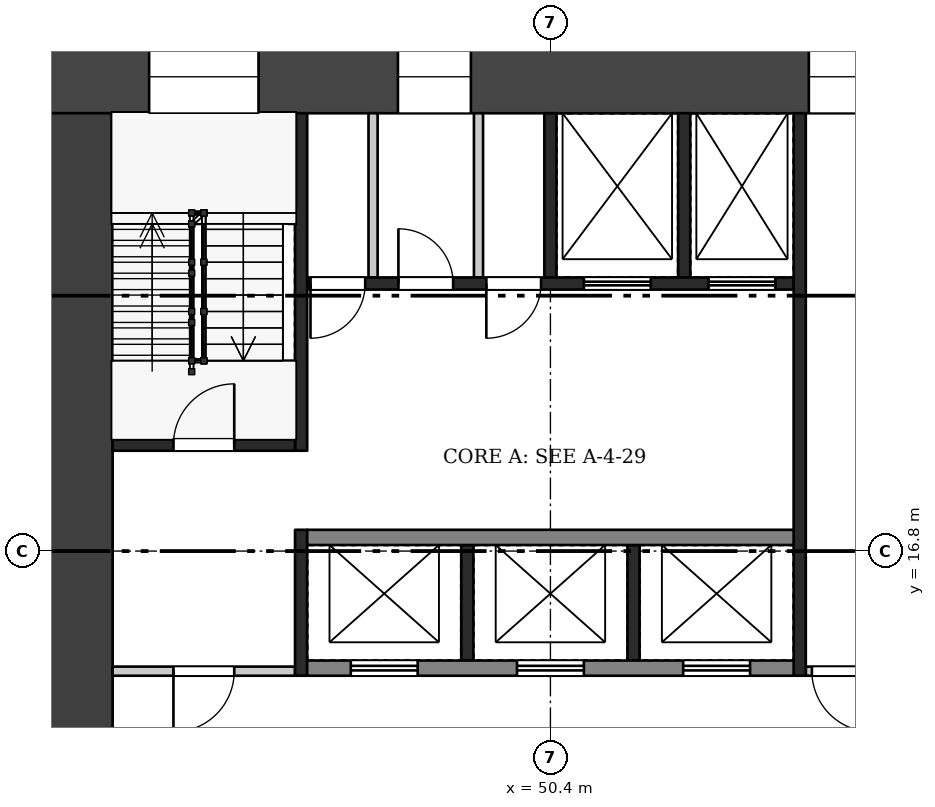
"""IFC4 building model, lengths in metres.
Left out: names, types, materials, properties, quantities, classifications, styles, units other than length and angle.
Written with IfcOpenShell. Run it as: python <this file> out.ifc"""

import sys

from ifc_helpers import new_model, si_unit, direction, frame, frame_2d, origin, place, context, subcontext, project, spatial, rectangle, extrude, element, fill, save


model = new_model("IFC4")
c1 = context("Model", 3, precision=1e-05, world=origin(), true_north=direction((0.0, 1.0)))
c2 = subcontext(c1, "Body", "Model", "MODEL_VIEW")
j1 = project(units=[si_unit("LENGTHUNIT", "METRE"), si_unit("PLANEANGLEUNIT", "RADIAN")], contexts=[c1])
p1 = place(None, origin())
s1 = spatial("IfcSite", under=j1, at=p1, CompositionType="ELEMENT")
p2 = place(p1, origin())
s2 = spatial("IfcBuilding", under=s1, at=p2, CompositionType="ELEMENT")
p3 = place(p2, frame((0.0, 0.0, 207.2)))
s3 = spatial("IfcBuildingStorey", under=s2, at=p3, CompositionType="ELEMENT", Elevation=207.2)
p4 = place(p3, frame((42.0, 24.6, 0.0), z_axis=(0.0, 0.0, 1.0), x_axis=(1.0, 0.0, 0.0)))
e1 = element("IfcWall", 1, at=p4, inside=s3, PredefinedType="SHEAR", context=c2, shape_type="SweptSolid", body=[
    extrude(rectangle(XDim=16.8, YDim=1.2, at=frame_2d((8.4, 0.0))), origin(), (0.0, 0.0, 1.0), 6.72),
])
p5 = place(p4, frame((1.8, 0.0, 0.5)))
e2 = element("IfcOpeningElement", 2, at=p5, cuts=e1, PredefinedType="OPENING", context=c2, shape_type="SweptSolid", body=[
    extrude(rectangle(XDim=1.8, YDim=2.4, at=frame_2d((0.9, 1.2))), frame((0.0, 0.61, 0.0), z_axis=(0.0, -1.0, 0.0), x_axis=(1.0, 0.0, 0.0)), (0.0, 0.0, 1.0), 1.22),
])
p6 = place(p4, frame((5.892, 0.0, 1.6)))
e3 = element("IfcOpeningElement", 3, at=p6, cuts=e1, PredefinedType="OPENING", context=c2, shape_type="SweptSolid", body=[
    extrude(rectangle(XDim=1.2, YDim=1.2, at=frame_2d((0.6, 0.6))), frame((0.0, 0.61, 0.0), z_axis=(0.0, -1.0, 0.0), x_axis=(1.0, 0.0, 0.0)), (0.0, 0.0, 1.0), 1.22),
])
p7 = place(p4, frame((12.65, 0.0, 0.6)))
e4 = element("IfcOpeningElement", 4, at=p7, cuts=e1, PredefinedType="OPENING", context=c2, shape_type="SweptSolid", body=[
    extrude(rectangle(XDim=1.0, YDim=2.1, at=frame_2d((0.5, 1.05))), frame((0.0, 0.61, 0.0), z_axis=(0.0, -1.0, 0.0), x_axis=(1.0, 0.0, 0.0)), (0.0, 0.0, 1.0), 1.22),
])
p8 = place(p4, frame((14.175, 0.0, 1.6)))
e5 = element("IfcOpeningElement", 5, at=p8, cuts=e1, PredefinedType="OPENING", context=c2, shape_type="SweptSolid", body=[
    extrude(rectangle(XDim=1.2, YDim=1.2, at=frame_2d((0.6, 0.6))), frame((0.0, 0.61, 0.0), z_axis=(0.0, -1.0, 0.0), x_axis=(1.0, 0.0, 0.0)), (0.0, 0.0, 1.0), 1.22),
])
p9 = place(p3, frame((42.6, 9.6, 0.0), z_axis=(0.0, 0.0, 1.0), x_axis=(0.0, 1.0, 0.0)))
e6 = element("IfcWall", 6, at=p9, inside=s3, PredefinedType="SHEAR", context=c2, shape_type="SweptSolid", body=[
    extrude(rectangle(XDim=14.4, YDim=1.2, at=frame_2d((7.2, 0.0))), origin(), (0.0, 0.0, 1.0), 6.72),
])
p10 = place(p9, frame((2.1, 0.0, 0.0)))
e7 = element("IfcOpeningElement", 7, at=p10, cuts=e6, PredefinedType="OPENING", context=c2, shape_type="SweptSolid", body=[
    extrude(rectangle(XDim=1.8, YDim=2.1, at=frame_2d((0.9, 1.05))), frame((0.0, 0.61, 0.0), z_axis=(0.0, -1.0, 0.0), x_axis=(1.0, 0.0, 0.0)), (0.0, 0.0, 1.0), 1.22),
])
for number, where, z_axis, x_axis in (
    (8, (49.033, 15.0, 0.0), (0.0, 0.0, 1.0), (0.0, 1.0, 0.0)),
    (9, (51.767, 15.0, 0.0), (0.0, 0.0, 1.0), (0.0, 1.0, 0.0)),
):
    element("IfcWall", number, at=place(p3, frame(where, z_axis=z_axis, x_axis=x_axis)), inside=s3, PredefinedType="SHEAR", context=c2, shape_type="SweptSolid", body=[
        extrude(rectangle(XDim=1.9, YDim=0.2, at=frame_2d((0.95, 0.0))), origin(), (0.0, 0.0, 1.0), 6.72),
    ])
p11 = place(p3, frame((46.4, 14.875, 0.0), z_axis=(0.0, 0.0, 1.0), x_axis=(1.0, 0.0, 0.0)))
e10 = element("IfcWall", 10, at=p11, inside=s3, PredefinedType="SHEAR", context=c2, shape_type="SweptSolid", body=[
    extrude(rectangle(XDim=8.0, YDim=0.25, at=frame_2d((4.0, 0.0))), origin(), (0.0, 0.0, 1.0), 6.72),
])
p12 = place(p11, frame((0.717, 0.0, 0.0)))
e11 = element("IfcOpeningElement", 11, at=p12, cuts=e10, PredefinedType="OPENING", context=c2, shape_type="SweptSolid", body=[
    extrude(rectangle(XDim=1.1, YDim=2.1, at=frame_2d((0.55, 1.05))), frame((0.0, 0.135, 0.0), z_axis=(0.0, -1.0, 0.0), x_axis=(1.0, 0.0, 0.0)), (0.0, 0.0, 1.0), 0.27),
])
p13 = place(p11, frame((3.45, 0.0, 0.0)))
e12 = element("IfcOpeningElement", 12, at=p13, cuts=e10, PredefinedType="OPENING", context=c2, shape_type="SweptSolid", body=[
    extrude(rectangle(XDim=1.1, YDim=2.1, at=frame_2d((0.55, 1.05))), frame((0.0, 0.135, 0.0), z_axis=(0.0, -1.0, 0.0), x_axis=(1.0, 0.0, 0.0)), (0.0, 0.0, 1.0), 0.27),
])
p14 = place(p11, frame((6.183, 0.0, 0.0)))
e13 = element("IfcOpeningElement", 13, at=p14, cuts=e10, PredefinedType="OPENING", context=c2, shape_type="SweptSolid", body=[
    extrude(rectangle(XDim=1.1, YDim=2.1, at=frame_2d((0.55, 1.05))), frame((0.0, 0.135, 0.0), z_axis=(0.0, -1.0, 0.0), x_axis=(1.0, 0.0, 0.0)), (0.0, 0.0, 1.0), 0.27),
])
p15 = place(p3, frame((46.4, 17.025, 0.0), z_axis=(0.0, 0.0, 1.0), x_axis=(1.0, 0.0, 0.0)))
e14 = element("IfcWall", 14, at=p15, inside=s3, PredefinedType="SHEAR", context=c2, shape_type="SweptSolid", body=[
    extrude(rectangle(XDim=8.0, YDim=0.25, at=frame_2d((4.0, 0.0))), origin(), (0.0, 0.0, 1.0), 6.72),
])
for number, where, z_axis, x_axis in (
    (15, (50.4, 21.3, 0.0), (0.0, 0.0, 1.0), (0.0, 1.0, 0.0)),
    (16, (52.6, 21.3, 0.0), (0.0, 0.0, 1.0), (0.0, 1.0, 0.0)),
):
    element("IfcWall", number, at=place(p3, frame(where, z_axis=z_axis, x_axis=x_axis)), inside=s3, PredefinedType="SHEAR", context=c2, shape_type="SweptSolid", body=[
        extrude(rectangle(XDim=2.7, YDim=0.2, at=frame_2d((1.35, 0.0))), origin(), (0.0, 0.0, 1.0), 6.72),
    ])
for number, where, z_axis, x_axis in (
    (17, (47.483, 21.3, 0.0), (0.0, 0.0, 1.0), (0.0, 1.0, 0.0)),
    (18, (49.217, 21.3, 0.0), (0.0, 0.0, 1.0), (0.0, 1.0, 0.0)),
):
    element("IfcWall", number, at=place(p3, frame(where, z_axis=z_axis, x_axis=x_axis)), inside=s3, PredefinedType="PARTITIONING", context=c2, shape_type="SweptSolid", body=[
        extrude(rectangle(XDim=2.7, YDim=0.15, at=frame_2d((1.35, 0.0))), origin(), (0.0, 0.0, 1.0), 6.72),
    ])
p16 = place(p3, frame((46.4, 21.2, 0.0), z_axis=(0.0, 0.0, 1.0), x_axis=(1.0, 0.0, 0.0)))
e19 = element("IfcWall", 19, at=p16, inside=s3, PredefinedType="SHEAR", context=c2, shape_type="SweptSolid", body=[
    extrude(rectangle(XDim=8.0, YDim=0.2, at=frame_2d((4.0, 0.0))), origin(), (0.0, 0.0, 1.0), 6.72),
])
p17 = place(p16, frame((0.054, 0.0, 0.0)))
e20 = element("IfcOpeningElement", 20, at=p17, cuts=e19, PredefinedType="OPENING", context=c2, shape_type="SweptSolid", body=[
    extrude(rectangle(XDim=0.9, YDim=2.1, at=frame_2d((0.45, 1.05))), frame((0.0, 0.11, 0.0), z_axis=(0.0, -1.0, 0.0), x_axis=(1.0, 0.0, 0.0)), (0.0, 0.0, 1.0), 0.22),
])
p18 = place(p16, frame((1.5, 0.0, 0.0)))
e21 = element("IfcOpeningElement", 21, at=p18, cuts=e19, PredefinedType="OPENING", context=c2, shape_type="SweptSolid", body=[
    extrude(rectangle(XDim=0.9, YDim=2.1, at=frame_2d((0.45, 1.05))), frame((0.0, 0.11, 0.0), z_axis=(0.0, -1.0, 0.0), x_axis=(1.0, 0.0, 0.0)), (0.0, 0.0, 1.0), 0.22),
])
p19 = place(p16, frame((2.946, 0.0, 0.0)))
e22 = element("IfcOpeningElement", 22, at=p19, cuts=e19, PredefinedType="OPENING", context=c2, shape_type="SweptSolid", body=[
    extrude(rectangle(XDim=0.9, YDim=2.1, at=frame_2d((0.45, 1.05))), frame((0.0, 0.11, 0.0), z_axis=(0.0, -1.0, 0.0), x_axis=(1.0, 0.0, 0.0)), (0.0, 0.0, 1.0), 0.22),
])
p20 = place(p16, frame((4.55, 0.0, 0.0)))
e23 = element("IfcOpeningElement", 23, at=p20, cuts=e19, PredefinedType="OPENING", context=c2, shape_type="SweptSolid", body=[
    extrude(rectangle(XDim=1.1, YDim=2.1, at=frame_2d((0.55, 1.05))), frame((0.0, 0.11, 0.0), z_axis=(0.0, -1.0, 0.0), x_axis=(1.0, 0.0, 0.0)), (0.0, 0.0, 1.0), 0.22),
])
p21 = place(p16, frame((6.6, 0.0, 0.0)))
e24 = element("IfcOpeningElement", 24, at=p21, cuts=e19, PredefinedType="OPENING", context=c2, shape_type="SweptSolid", body=[
    extrude(rectangle(XDim=1.1, YDim=2.1, at=frame_2d((0.55, 1.05))), frame((0.0, 0.11, 0.0), z_axis=(0.0, -1.0, 0.0), x_axis=(1.0, 0.0, 0.0)), (0.0, 0.0, 1.0), 0.22),
])
p22 = place(p3, frame((46.3, 14.75, 0.0), z_axis=(0.0, 0.0, 1.0), x_axis=(0.0, 1.0, 0.0)))
e25 = element("IfcWall", 25, at=p22, inside=s3, PredefinedType="SHEAR", context=c2, shape_type="SweptSolid", body=[
    extrude(rectangle(XDim=2.4, YDim=0.2, at=frame_2d((1.2, 0.0))), origin(), (0.0, 0.0, 1.0), 6.72),
])
p23 = place(p3, frame((46.3, 18.45, 0.0), z_axis=(0.0, 0.0, 1.0), x_axis=(0.0, 1.0, 0.0)))
e26 = element("IfcWall", 26, at=p23, inside=s3, PredefinedType="SHEAR", context=c2, shape_type="SweptSolid", body=[
    extrude(rectangle(XDim=5.55, YDim=0.2, at=frame_2d((2.775, 0.0))), origin(), (0.0, 0.0, 1.0), 6.72),
])
p24 = place(p3, frame((43.2, 14.825, 0.0), z_axis=(0.0, 0.0, 1.0), x_axis=(1.0, 0.0, 0.0)))
e27 = element("IfcWall", 27, at=p24, inside=s3, PredefinedType="PARTITIONING", context=c2, shape_type="SweptSolid", body=[
    extrude(rectangle(XDim=3.0, YDim=0.15, at=frame_2d((1.5, 0.0))), origin(), (0.0, 0.0, 1.0), 6.72),
])
p25 = place(p24, frame((1.0, 0.0, 0.0)))
e28 = element("IfcOpeningElement", 28, at=p25, cuts=e27, PredefinedType="OPENING", context=c2, shape_type="SweptSolid", body=[
    extrude(rectangle(XDim=1.0, YDim=2.1, at=frame_2d((0.5, 1.05))), frame((0.0, 0.085, 0.0), z_axis=(0.0, -1.0, 0.0), x_axis=(1.0, 0.0, 0.0)), (0.0, 0.0, 1.0), 0.17),
])
p26 = place(p3, frame((43.2, 18.55, 0.0), z_axis=(0.0, 0.0, 1.0), x_axis=(1.0, 0.0, 0.0)))
e29 = element("IfcWall", 29, at=p26, inside=s3, PredefinedType="SHEAR", context=c2, shape_type="SweptSolid", body=[
    extrude(rectangle(XDim=3.0, YDim=0.2, at=frame_2d((1.5, 0.0))), origin(), (0.0, 0.0, 1.0), 6.72),
])
p27 = place(p26, frame((1.0, 0.0, 0.0)))
e30 = element("IfcOpeningElement", 30, at=p27, cuts=e29, PredefinedType="OPENING", context=c2, shape_type="SweptSolid", body=[
    extrude(rectangle(XDim=1.0, YDim=2.1, at=frame_2d((0.5, 1.05))), frame((0.0, 0.11, 0.0), z_axis=(0.0, -1.0, 0.0), x_axis=(1.0, 0.0, 0.0)), (0.0, 0.0, 1.0), 0.22),
])
p28 = place(p3, frame((54.5, 14.75, 0.0), z_axis=(0.0, 0.0, 1.0), x_axis=(0.0, 1.0, 0.0)))
e31 = element("IfcWall", 31, at=p28, inside=s3, PredefinedType="SHEAR", context=c2, shape_type="SweptSolid", body=[
    extrude(rectangle(XDim=9.25, YDim=0.2, at=frame_2d((4.625, 0.0))), origin(), (0.0, 0.0, 1.0), 6.72),
])
p29 = place(p3, frame((54.6, 14.825, 0.0), z_axis=(0.0, 0.0, 1.0), x_axis=(1.0, 0.0, 0.0)))
e32 = element("IfcWall", 32, at=p29, inside=s3, PredefinedType="PARTITIONING", context=c2, shape_type="SweptSolid", body=[
    extrude(rectangle(XDim=3.0, YDim=0.15, at=frame_2d((1.5, 0.0))), origin(), (0.0, 0.0, 1.0), 6.72),
])
p30 = place(p29, frame((0.1, 0.0, 0.0)))
e33 = element("IfcOpeningElement", 33, at=p30, cuts=e32, PredefinedType="OPENING", context=c2, shape_type="SweptSolid", body=[
    extrude(rectangle(XDim=1.0, YDim=2.1, at=frame_2d((0.5, 1.05))), frame((0.0, 0.085, 0.0), z_axis=(0.0, -1.0, 0.0), x_axis=(1.0, 0.0, 0.0)), (0.0, 0.0, 1.0), 0.17),
])
p31 = place(p12, origin())
e34 = element("IfcDoor", 34, at=p31, inside=s3, OperationType="DOUBLE_DOOR_SLIDING", PredefinedType="DOOR", context=c2, shape_type="SweptSolid", body=[
    extrude(rectangle(XDim=1.1, YDim=2.1, at=frame_2d((0.55, 1.05))), frame((0.0, 0.025, 0.0), z_axis=(0.0, -1.0, 0.0), x_axis=(1.0, 0.0, 0.0)), (0.0, 0.0, 1.0), 0.05),
])
fill(e11, e34)
p32 = place(p13, origin())
e35 = element("IfcDoor", 35, at=p32, inside=s3, OperationType="DOUBLE_DOOR_SLIDING", PredefinedType="DOOR", context=c2, shape_type="SweptSolid", body=[
    extrude(rectangle(XDim=1.1, YDim=2.1, at=frame_2d((0.55, 1.05))), frame((0.0, 0.025, 0.0), z_axis=(0.0, -1.0, 0.0), x_axis=(1.0, 0.0, 0.0)), (0.0, 0.0, 1.0), 0.05),
])
fill(e12, e35)
p33 = place(p14, origin())
e36 = element("IfcDoor", 36, at=p33, inside=s3, OperationType="DOUBLE_DOOR_SLIDING", PredefinedType="DOOR", context=c2, shape_type="SweptSolid", body=[
    extrude(rectangle(XDim=1.1, YDim=2.1, at=frame_2d((0.55, 1.05))), frame((0.0, 0.025, 0.0), z_axis=(0.0, -1.0, 0.0), x_axis=(1.0, 0.0, 0.0)), (0.0, 0.0, 1.0), 0.05),
])
fill(e13, e36)
p34 = place(p17, frame((0.9, 0.0, 0.0), z_axis=(0.0, 0.0, 1.0), x_axis=(-1.0, 0.0, 0.0)))
e37 = element("IfcDoor", 37, at=p34, inside=s3, OperationType="SINGLE_SWING_RIGHT", PredefinedType="DOOR", context=c2, shape_type="SweptSolid", body=[
    extrude(rectangle(XDim=0.9, YDim=2.1, at=frame_2d((0.45, 1.05))), frame((0.0, 0.025, 0.0), z_axis=(0.0, -1.0, 0.0), x_axis=(1.0, 0.0, 0.0)), (0.0, 0.0, 1.0), 0.05),
])
fill(e20, e37)
p35 = place(p18, origin())
e38 = element("IfcDoor", 38, at=p35, inside=s3, OperationType="SINGLE_SWING_LEFT", PredefinedType="DOOR", context=c2, shape_type="SweptSolid", body=[
    extrude(rectangle(XDim=0.9, YDim=2.1, at=frame_2d((0.45, 1.05))), frame((0.0, 0.025, 0.0), z_axis=(0.0, -1.0, 0.0), x_axis=(1.0, 0.0, 0.0)), (0.0, 0.0, 1.0), 0.05),
])
fill(e21, e38)
p36 = place(p19, frame((0.9, 0.0, 0.0), z_axis=(0.0, 0.0, 1.0), x_axis=(-1.0, 0.0, 0.0)))
e39 = element("IfcDoor", 39, at=p36, inside=s3, OperationType="SINGLE_SWING_RIGHT", PredefinedType="DOOR", context=c2, shape_type="SweptSolid", body=[
    extrude(rectangle(XDim=0.9, YDim=2.1, at=frame_2d((0.45, 1.05))), frame((0.0, 0.025, 0.0), z_axis=(0.0, -1.0, 0.0), x_axis=(1.0, 0.0, 0.0)), (0.0, 0.0, 1.0), 0.05),
])
fill(e22, e39)
p37 = place(p20, origin())
e40 = element("IfcDoor", 40, at=p37, inside=s3, OperationType="DOUBLE_DOOR_SLIDING", PredefinedType="DOOR", context=c2, shape_type="SweptSolid", body=[
    extrude(rectangle(XDim=1.1, YDim=2.1, at=frame_2d((0.55, 1.05))), frame((0.0, 0.025, 0.0), z_axis=(0.0, -1.0, 0.0), x_axis=(1.0, 0.0, 0.0)), (0.0, 0.0, 1.0), 0.05),
])
fill(e23, e40)
p38 = place(p21, origin())
e41 = element("IfcDoor", 41, at=p38, inside=s3, OperationType="DOUBLE_DOOR_SLIDING", PredefinedType="DOOR", context=c2, shape_type="SweptSolid", body=[
    extrude(rectangle(XDim=1.1, YDim=2.1, at=frame_2d((0.55, 1.05))), frame((0.0, 0.025, 0.0), z_axis=(0.0, -1.0, 0.0), x_axis=(1.0, 0.0, 0.0)), (0.0, 0.0, 1.0), 0.05),
])
fill(e24, e41)
p39 = place(p25, frame((1.0, 0.0, 0.0), z_axis=(0.0, 0.0, 1.0), x_axis=(-1.0, 0.0, 0.0)))
e42 = element("IfcDoor", 42, at=p39, inside=s3, OperationType="SINGLE_SWING_RIGHT", PredefinedType="DOOR", context=c2, shape_type="SweptSolid", body=[
    extrude(rectangle(XDim=1.0, YDim=2.1, at=frame_2d((0.5, 1.05))), frame((0.0, 0.025, 0.0), z_axis=(0.0, -1.0, 0.0), x_axis=(1.0, 0.0, 0.0)), (0.0, 0.0, 1.0), 0.05),
])
fill(e28, e42)
p40 = place(p27, origin())
e43 = element("IfcDoor", 43, at=p40, inside=s3, OperationType="SINGLE_SWING_RIGHT", PredefinedType="DOOR", context=c2, shape_type="SweptSolid", body=[
    extrude(rectangle(XDim=1.0, YDim=2.1, at=frame_2d((0.5, 1.05))), frame((0.0, 0.025, 0.0), z_axis=(0.0, -1.0, 0.0), x_axis=(1.0, 0.0, 0.0)), (0.0, 0.0, 1.0), 0.05),
])
fill(e30, e43)
p41 = place(p30, frame((1.0, 0.0, 0.0), z_axis=(0.0, 0.0, 1.0), x_axis=(-1.0, 0.0, 0.0)))
e44 = element("IfcDoor", 44, at=p41, inside=s3, OperationType="SINGLE_SWING_LEFT", PredefinedType="DOOR", context=c2, shape_type="SweptSolid", body=[
    extrude(rectangle(XDim=1.0, YDim=2.1, at=frame_2d((0.5, 1.05))), frame((0.0, 0.025, 0.0), z_axis=(0.0, -1.0, 0.0), x_axis=(1.0, 0.0, 0.0)), (0.0, 0.0, 1.0), 0.05),
])
fill(e33, e44)
p42 = place(p5, origin())
e45 = element("IfcWindow", 45, at=p42, inside=s3, PartitioningType="SINGLE_PANEL", PredefinedType="WINDOW", context=c2, shape_type="SweptSolid", body=[
    extrude(rectangle(XDim=1.8, YDim=2.4, at=frame_2d((0.9, 1.2))), frame((0.0, 0.03, 0.0), z_axis=(0.0, -1.0, 0.0), x_axis=(1.0, 0.0, 0.0)), (0.0, 0.0, 1.0), 0.06),
])
fill(e2, e45)
p43 = place(p6, origin())
e46 = element("IfcWindow", 46, at=p43, inside=s3, PartitioningType="SINGLE_PANEL", PredefinedType="WINDOW", context=c2, shape_type="SweptSolid", body=[
    extrude(rectangle(XDim=1.2, YDim=1.2, at=frame_2d((0.6, 0.6))), frame((0.0, 0.03, 0.0), z_axis=(0.0, -1.0, 0.0), x_axis=(1.0, 0.0, 0.0)), (0.0, 0.0, 1.0), 0.06),
])
fill(e3, e46)
p44 = place(p7, origin())
e47 = element("IfcWindow", 47, at=p44, inside=s3, PartitioningType="SINGLE_PANEL", PredefinedType="WINDOW", context=c2, shape_type="SweptSolid", body=[
    extrude(rectangle(XDim=1.0, YDim=2.1, at=frame_2d((0.5, 1.05))), frame((0.0, 0.03, 0.0), z_axis=(0.0, -1.0, 0.0), x_axis=(1.0, 0.0, 0.0)), (0.0, 0.0, 1.0), 0.06),
])
fill(e4, e47)
save(model, sys.argv[1])
